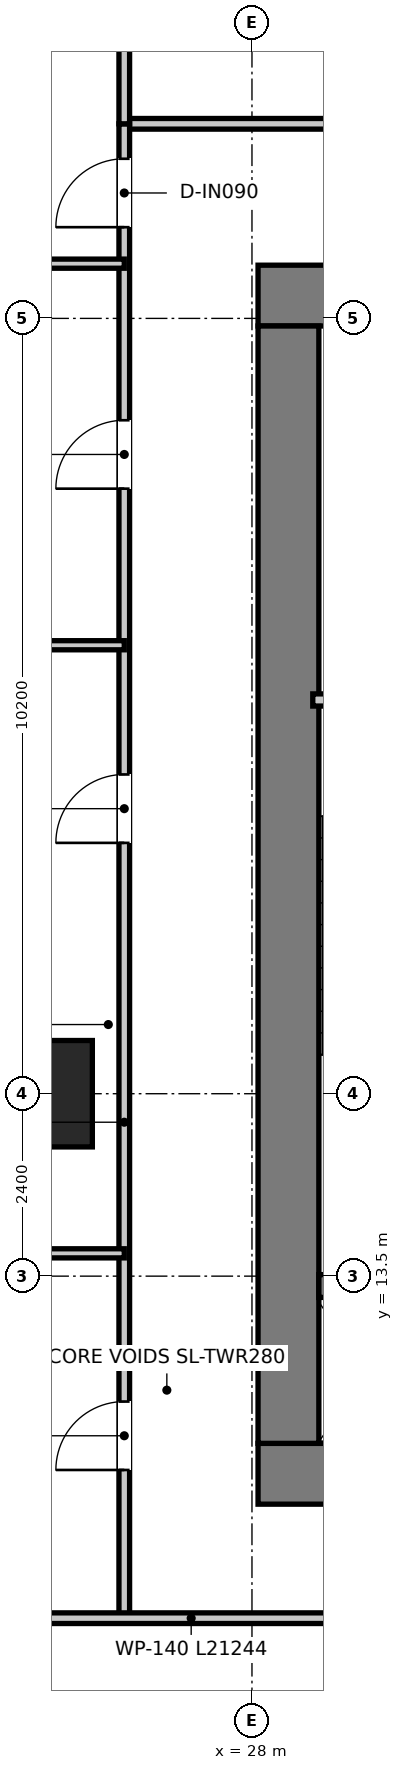
"""IFC4 building model, lengths in metres.
Left out: names, types, materials, properties, quantities, classifications, styles, units other than length and angle.
Written with IfcOpenShell. Run it as: python <this file> out.ifc"""

import sys

from ifc_helpers import new_model, si_unit, direction, frame, frame_2d, origin, origin_2d, place, context, subcontext, project, spatial, rectangle, extrude, source, transform, mapped, element, fill, save


model = new_model("IFC4")
c1 = context("Model", 3, precision=1e-05, world=origin(), true_north=direction((0.0, 1.0)))
c2 = subcontext(c1, "Body", "Model", "MODEL_VIEW")
j1 = project(units=[si_unit("LENGTHUNIT", "METRE"), si_unit("PLANEANGLEUNIT", "RADIAN")], contexts=[c1])
p1 = place(None, origin())
s1 = spatial("IfcSite", under=j1, at=p1, CompositionType="ELEMENT")
p2 = place(p1, origin())
s2 = spatial("IfcBuilding", under=s1, at=p2, CompositionType="ELEMENT")
p3 = place(p2, frame((0.0, 0.0, 310.85)))
s3 = spatial("IfcBuildingStorey", under=s2, at=p3, CompositionType="ELEMENT", Elevation=310.85)
p4 = place(p3, frame((28.08, 10.9, 0.0), z_axis=(0.0, 0.0, 1.0), x_axis=(1.0, 0.0, 0.0)))
e1 = element("IfcWall", 1, at=p4, inside=s3, PredefinedType="SHEAR", context=c2, shape_type="SweptSolid", body=[
    extrude(rectangle(XDim=15.84, YDim=0.8, at=frame_2d((7.92, 0.0))), origin(), (0.0, 0.0, 1.0), 3.95),
])
p5 = place(p3, frame((28.08, 26.4, 0.0), z_axis=(0.0, 0.0, 1.0), x_axis=(1.0, 0.0, 0.0)))
e2 = element("IfcWall", 2, at=p5, inside=s3, PredefinedType="SHEAR", context=c2, shape_type="SweptSolid", body=[
    extrude(rectangle(XDim=15.84, YDim=0.8, at=frame_2d((7.92, 0.0))), origin(), (0.0, 0.0, 1.0), 3.95),
])
p6 = place(p5, frame((7.22, 0.0, 0.0)))
e3 = element("IfcOpeningElement", 3, at=p6, cuts=e2, PredefinedType="OPENING", context=c2, shape_type="SweptSolid", body=[
    extrude(rectangle(XDim=1.4, YDim=2.2, at=frame_2d((0.7, 1.1))), frame((0.0, 0.41, 0.0), z_axis=(0.0, -1.0, 0.0), x_axis=(1.0, 0.0, 0.0)), (0.0, 0.0, 1.0), 0.82),
])
p7 = place(p5, frame((1.775, 0.0, 0.0)))
e4 = element("IfcOpeningElement", 4, at=p7, cuts=e2, PredefinedType="OPENING", context=c2, shape_type="SweptSolid", body=[
    extrude(rectangle(XDim=1.05, YDim=2.1, at=frame_2d((0.525, 1.05))), frame((0.0, 0.41, 0.0), z_axis=(0.0, -1.0, 0.0), x_axis=(1.0, 0.0, 0.0)), (0.0, 0.0, 1.0), 0.82),
])
p8 = place(p5, frame((13.015, 0.0, 0.0)))
e5 = element("IfcOpeningElement", 5, at=p8, cuts=e2, PredefinedType="OPENING", context=c2, shape_type="SweptSolid", body=[
    extrude(rectangle(XDim=1.05, YDim=2.1, at=frame_2d((0.525, 1.05))), frame((0.0, 0.41, 0.0), z_axis=(0.0, -1.0, 0.0), x_axis=(1.0, 0.0, 0.0)), (0.0, 0.0, 1.0), 0.82),
])
p9 = place(p3, frame((28.48, 11.3, 0.0), z_axis=(0.0, 0.0, 1.0), x_axis=(0.0, 1.0, 0.0)))
e6 = element("IfcWall", 6, at=p9, inside=s3, PredefinedType="SHEAR", context=c2, shape_type="SweptSolid", body=[
    extrude(rectangle(XDim=14.7, YDim=0.8, at=frame_2d((7.35, 0.0))), origin(), (0.0, 0.0, 1.0), 3.95),
])
p10 = place(p3, frame((28.88, 13.37, 0.0), z_axis=(0.0, 0.0, 1.0), x_axis=(1.0, 0.0, 0.0)))
e7 = element("IfcWall", 7, at=p10, inside=s3, PredefinedType="SHEAR", context=c2, shape_type="SweptSolid", body=[
    extrude(rectangle(XDim=3.1, YDim=0.3, at=frame_2d((1.55, 0.0))), origin(), (0.0, 0.0, 1.0), 3.95),
])
m1 = source(origin(), c2, "Body", "SweptSolid", [
    extrude(rectangle(XDim=1.4, YDim=1.4, at=origin_2d()), origin(), (0.0, 0.0, 1.0), 3.95),
])
p11 = place(p3, frame((25.2, 15.9, 0.0), z_axis=(0.0, 0.0, 1.0), x_axis=(1.0, 0.0, 0.0)))
e8 = element("IfcColumn", 8, at=p11, inside=s3, PredefinedType="USERDEFINED", context=c2, shape_type="MappedRepresentation", body=[
    mapped(m1, transform((0.0, 0.0, 0.0), x_axis=(1.0, 0.0, 0.0), y_axis=(0.0, 1.0, 0.0), z_axis=(0.0, 0.0, 1.0), scale=1.0)),
])
p12 = place(p3, frame((28.8, 21.08, 0.0), z_axis=(0.0, 0.0, 1.0), x_axis=(1.0, 0.0, 0.0)))
e9 = element("IfcWall", 9, at=p12, inside=s3, PredefinedType="PARTITIONING", context=c2, shape_type="SweptSolid", body=[
    extrude(rectangle(XDim=3.16, YDim=0.16, at=frame_2d((1.58, 0.0))), origin(), (0.0, 0.0, 1.0), 3.67),
])
p13 = place(p12, frame((1.055, 0.0, 0.0)))
e10 = element("IfcOpeningElement", 10, at=p13, cuts=e9, PredefinedType="OPENING", context=c2, shape_type="SweptSolid", body=[
    extrude(rectangle(XDim=1.05, YDim=2.1, at=frame_2d((0.525, 1.05))), frame((0.0, 0.09, 0.0), z_axis=(0.0, -1.0, 0.0), x_axis=(1.0, 0.0, 0.0)), (0.0, 0.0, 1.0), 0.18),
])
p14 = place(p3, frame((26.32, 28.66, 0.0), z_axis=(0.0, 0.0, 1.0), x_axis=(1.0, 0.0, 0.0)))
e11 = element("IfcWall", 11, at=p14, inside=s3, PredefinedType="PARTITIONING", context=c2, shape_type="SweptSolid", body=[
    extrude(rectangle(XDim=19.36, YDim=0.14, at=frame_2d((9.68, 0.0))), origin(), (0.0, 0.0, 1.0), 3.18),
])
p15 = place(p14, frame((2.865, 0.0, 0.0)))
e12 = element("IfcOpeningElement", 12, at=p15, cuts=e11, PredefinedType="OPENING", context=c2, shape_type="SweptSolid", body=[
    extrude(rectangle(XDim=0.95, YDim=2.1, at=frame_2d((0.475, 1.05))), frame((0.0, 0.08, 0.0), z_axis=(0.0, -1.0, 0.0), x_axis=(1.0, 0.0, 0.0)), (0.0, 0.0, 1.0), 0.16),
])
p16 = place(p14, frame((9.955, 0.0, 0.0)))
e13 = element("IfcOpeningElement", 13, at=p16, cuts=e11, PredefinedType="OPENING", context=c2, shape_type="SweptSolid", body=[
    extrude(rectangle(XDim=0.95, YDim=2.1, at=frame_2d((0.475, 1.05))), frame((0.0, 0.08, 0.0), z_axis=(0.0, -1.0, 0.0), x_axis=(1.0, 0.0, 0.0)), (0.0, 0.0, 1.0), 0.16),
])
p17 = place(p14, frame((16.295, 0.0, 0.0)))
e14 = element("IfcOpeningElement", 14, at=p17, cuts=e11, PredefinedType="OPENING", context=c2, shape_type="SweptSolid", body=[
    extrude(rectangle(XDim=0.95, YDim=2.1, at=frame_2d((0.475, 1.05))), frame((0.0, 0.08, 0.0), z_axis=(0.0, -1.0, 0.0), x_axis=(1.0, 0.0, 0.0)), (0.0, 0.0, 1.0), 0.16),
])
p18 = place(p3, frame((26.32, 9.0, 0.0), z_axis=(0.0, 0.0, 1.0), x_axis=(0.0, 1.0, 0.0)))
e15 = element("IfcWall", 15, at=p18, inside=s3, PredefinedType="PARTITIONING", context=c2, shape_type="SweptSolid", body=[
    extrude(rectangle(XDim=19.66, YDim=0.14, at=frame_2d((9.83, 0.0))), origin(), (0.0, 0.0, 1.0), 3.13),
])
p19 = place(p18, frame((18.3, 0.0, 0.0)))
e16 = element("IfcOpeningElement", 16, at=p19, cuts=e15, PredefinedType="OPENING", context=c2, shape_type="SweptSolid", body=[
    extrude(rectangle(XDim=0.9, YDim=2.1, at=frame_2d((0.45, 1.05))), frame((0.0, 0.08, 0.0), z_axis=(0.0, -1.0, 0.0), x_axis=(1.0, 0.0, 0.0)), (0.0, 0.0, 1.0), 0.16),
])
p20 = place(p18, frame((1.95, 0.0, 0.0)))
e17 = element("IfcOpeningElement", 17, at=p20, cuts=e15, PredefinedType="OPENING", context=c2, shape_type="SweptSolid", body=[
    extrude(rectangle(XDim=0.9, YDim=2.1, at=frame_2d((0.45, 1.05))), frame((0.0, 0.08, 0.0), z_axis=(0.0, -1.0, 0.0), x_axis=(1.0, 0.0, 0.0)), (0.0, 0.0, 1.0), 0.16),
])
p21 = place(p18, frame((10.2, 0.0, 0.0)))
e18 = element("IfcOpeningElement", 18, at=p21, cuts=e15, PredefinedType="OPENING", context=c2, shape_type="SweptSolid", body=[
    extrude(rectangle(XDim=0.9, YDim=2.1, at=frame_2d((0.45, 1.05))), frame((0.0, 0.08, 0.0), z_axis=(0.0, -1.0, 0.0), x_axis=(1.0, 0.0, 0.0)), (0.0, 0.0, 1.0), 0.16),
])
p22 = place(p18, frame((14.86, 0.0, 0.0)))
e19 = element("IfcOpeningElement", 19, at=p22, cuts=e15, PredefinedType="OPENING", context=c2, shape_type="SweptSolid", body=[
    extrude(rectangle(XDim=0.9, YDim=2.1, at=frame_2d((0.45, 1.05))), frame((0.0, 0.08, 0.0), z_axis=(0.0, -1.0, 0.0), x_axis=(1.0, 0.0, 0.0)), (0.0, 0.0, 1.0), 0.16),
])
p23 = place(p3, frame((22.975, 9.0, 0.0), z_axis=(0.0, 0.0, 1.0), x_axis=(1.0, 0.0, 0.0)))
e20 = element("IfcWall", 20, at=p23, inside=s3, PredefinedType="PARTITIONING", context=c2, shape_type="SweptSolid", body=[
    extrude(rectangle(XDim=21.244, YDim=0.14, at=frame_2d((10.622, 0.0))), origin(), (0.0, 0.0, 1.0), 3.67),
])
p24 = place(p23, frame((8.6, 0.0, 0.0)))
e21 = element("IfcOpeningElement", 21, at=p24, cuts=e20, PredefinedType="OPENING", context=c2, shape_type="SweptSolid", body=[
    extrude(rectangle(XDim=0.85, YDim=2.1, at=frame_2d((0.425, 1.05))), frame((0.0, 0.08, 0.0), z_axis=(0.0, -1.0, 0.0), x_axis=(1.0, 0.0, 0.0)), (0.0, 0.0, 1.0), 0.16),
])
p25 = place(p23, frame((16.6, 0.0, 0.0)))
e22 = element("IfcOpeningElement", 22, at=p25, cuts=e20, PredefinedType="OPENING", context=c2, shape_type="SweptSolid", body=[
    extrude(rectangle(XDim=0.85, YDim=2.1, at=frame_2d((0.425, 1.05))), frame((0.0, 0.08, 0.0), z_axis=(0.0, -1.0, 0.0), x_axis=(1.0, 0.0, 0.0)), (0.0, 0.0, 1.0), 0.16),
])
p26 = place(p3, frame((14.188, 26.82, 0.0), z_axis=(0.0, 0.0, 1.0), x_axis=(1.0, 0.0, 0.0)))
e23 = element("IfcWall", 23, at=p26, inside=s3, PredefinedType="PARTITIONING", context=c2, shape_type="SweptSolid", body=[
    extrude(rectangle(XDim=12.133, YDim=0.12, at=frame_2d((6.066, 0.0))), origin(), (0.0, 0.0, 1.0), 3.13),
])
p27 = place(p3, frame((26.32, 28.66, 0.0), z_axis=(0.0, 0.0, 1.0), x_axis=(0.0, 1.0, 0.0)))
e24 = element("IfcWall", 24, at=p27, inside=s3, PredefinedType="PARTITIONING", context=c2, shape_type="SweptSolid", body=[
    extrude(rectangle(XDim=2.64, YDim=0.14, at=frame_2d((1.32, 0.0))), origin(), (0.0, 0.0, 1.0), 3.43),
])
p28 = place(p3, frame((20.608, 13.8, 0.0), z_axis=(0.0, 0.0, 1.0), x_axis=(1.0, 0.0, 0.0)))
e25 = element("IfcWall", 25, at=p28, inside=s3, PredefinedType="PARTITIONING", context=c2, shape_type="SweptSolid", body=[
    extrude(rectangle(XDim=5.712, YDim=0.12, at=frame_2d((2.856, 0.0))), origin(), (0.0, 0.0, 1.0), 3.18),
])
p29 = place(p3, frame((16.663, 21.8, 0.0), z_axis=(0.0, 0.0, 1.0), x_axis=(1.0, 0.0, 0.0)))
e26 = element("IfcWall", 26, at=p29, inside=s3, PredefinedType="PARTITIONING", context=c2, shape_type="SweptSolid", body=[
    extrude(rectangle(XDim=9.657, YDim=0.12, at=frame_2d((4.829, 0.0))), origin(), (0.0, 0.0, 1.0), 3.13),
])
p30 = place(p19, origin())
e27 = element("IfcDoor", 27, at=p30, inside=s3, OperationType="SINGLE_SWING_LEFT", PredefinedType="DOOR", context=c2, shape_type="SweptSolid", body=[
    extrude(rectangle(XDim=0.9, YDim=2.1, at=frame_2d((0.45, 1.05))), frame((0.0, 0.025, 0.0), z_axis=(0.0, -1.0, 0.0), x_axis=(1.0, 0.0, 0.0)), (0.0, 0.0, 1.0), 0.05),
])
fill(e16, e27)
p31 = place(p20, origin())
e28 = element("IfcDoor", 28, at=p31, inside=s3, OperationType="SINGLE_SWING_LEFT", PredefinedType="DOOR", context=c2, shape_type="SweptSolid", body=[
    extrude(rectangle(XDim=0.9, YDim=2.1, at=frame_2d((0.45, 1.05))), frame((0.0, 0.025, 0.0), z_axis=(0.0, -1.0, 0.0), x_axis=(1.0, 0.0, 0.0)), (0.0, 0.0, 1.0), 0.05),
])
fill(e17, e28)
p32 = place(p21, origin())
e29 = element("IfcDoor", 29, at=p32, inside=s3, OperationType="SINGLE_SWING_LEFT", PredefinedType="DOOR", context=c2, shape_type="SweptSolid", body=[
    extrude(rectangle(XDim=0.9, YDim=2.1, at=frame_2d((0.45, 1.05))), frame((0.0, 0.025, 0.0), z_axis=(0.0, -1.0, 0.0), x_axis=(1.0, 0.0, 0.0)), (0.0, 0.0, 1.0), 0.05),
])
fill(e18, e29)
p33 = place(p22, origin())
e30 = element("IfcDoor", 30, at=p33, inside=s3, OperationType="SINGLE_SWING_LEFT", PredefinedType="DOOR", context=c2, shape_type="SweptSolid", body=[
    extrude(rectangle(XDim=0.9, YDim=2.1, at=frame_2d((0.45, 1.05))), frame((0.0, 0.025, 0.0), z_axis=(0.0, -1.0, 0.0), x_axis=(1.0, 0.0, 0.0)), (0.0, 0.0, 1.0), 0.05),
])
fill(e19, e30)
save(model, sys.argv[1])
